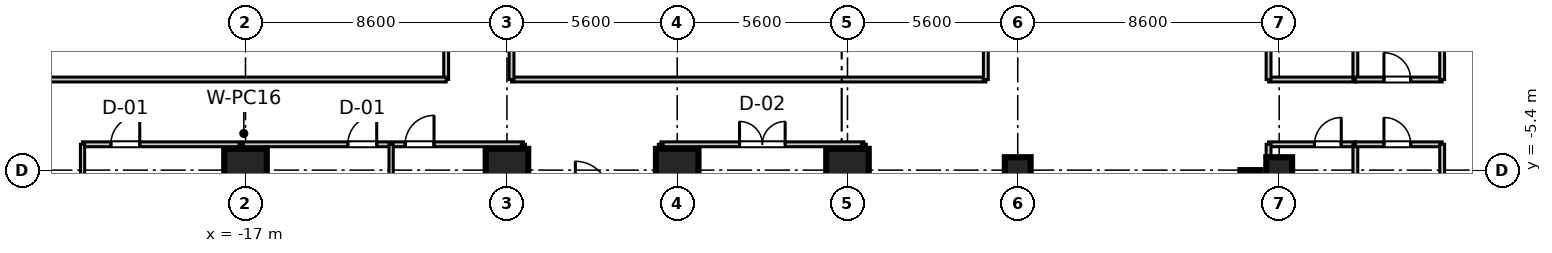
"""IFC4 building model, lengths in metres.
Left out: names, types, materials, properties, quantities, classifications, styles, units other than length and angle.
Written with IfcOpenShell. Run it as: python <this file> out.ifc"""

import sys

from ifc_helpers import new_model, si_unit, direction, frame, frame_2d, origin, origin_2d, place, context, subcontext, project, spatial, rectangle, extrude, source, transform, mapped, element, fill, save


model = new_model("IFC4")
c1 = context("Model", 3, precision=1e-05, world=origin(), true_north=direction((0.0, 1.0)))
c2 = subcontext(c1, "Body", "Model", "MODEL_VIEW")
j1 = project(units=[si_unit("LENGTHUNIT", "METRE"), si_unit("PLANEANGLEUNIT", "RADIAN")], contexts=[c1])
p1 = place(None, origin())
s1 = spatial("IfcSite", under=j1, at=p1, CompositionType="ELEMENT")
p2 = place(p1, origin())
s2 = spatial("IfcBuilding", under=s1, at=p2, CompositionType="ELEMENT")
p3 = place(p2, frame((0.0, 0.0, 76.2)))
s3 = spatial("IfcBuildingStorey", under=s2, at=p3, CompositionType="ELEMENT", Elevation=76.2)
m1 = source(origin(), c2, "Body", "SweptSolid", [
    extrude(rectangle(XDim=1.4, YDim=1.4, at=origin_2d()), origin(), (0.0, 0.0, 1.0), 3.605),
])
for number, where, z_axis, x_axis in (
    (1, (-17.0, -5.4, 0.0), (0.0, 0.0, 1.0), (1.0, 0.0, 0.0)),
    (2, (-8.4, -5.4, 0.0), (0.0, 0.0, 1.0), (1.0, 0.0, 0.0)),
    (3, (-2.8, -5.4, 0.0), (0.0, 0.0, 1.0), (1.0, 0.0, 0.0)),
    (4, (2.8, -5.4, 0.0), (0.0, 0.0, 1.0), (1.0, 0.0, 0.0)),
):
    element("IfcColumn", number, at=place(p3, frame(where, z_axis=z_axis, x_axis=x_axis)), inside=s3, PredefinedType="COLUMN", context=c2, shape_type="MappedRepresentation", body=[
        mapped(m1, transform((0.0, 0.0, 0.0), scale=1.0)),
    ])
m2 = source(origin(), c2, "Body", "SweptSolid", [
    extrude(rectangle(XDim=0.85, YDim=0.85, at=origin_2d()), origin(), (0.0, 0.0, 1.0), 3.605),
])
for number, where, z_axis, x_axis in (
    (5, (8.4, -5.4, 0.0), (0.0, 0.0, 1.0), (1.0, 0.0, 0.0)),
    (6, (17.0, -5.4, 0.0), (0.0, 0.0, 1.0), (1.0, 0.0, 0.0)),
):
    element("IfcColumn", number, at=place(p3, frame(where, z_axis=z_axis, x_axis=x_axis)), inside=s3, PredefinedType="PILASTER", context=c2, shape_type="MappedRepresentation", body=[
        mapped(m2, transform((0.0, 0.0, 0.0), scale=1.0)),
    ])
m3 = source(origin(), c2, "Body", "SweptSolid", [
    extrude(rectangle(XDim=11.6, YDim=0.65, at=frame_2d((5.8, 0.0))), origin(), (0.0, 0.0, 1.0), 3.37),
])
p4 = place(p3, frame((16.05, -17.0, 0.0), z_axis=(0.0, 0.0, 1.0), x_axis=(0.0, 1.0, 0.0)))
e7 = element("IfcWall", 7, at=p4, inside=s3, PredefinedType="SHEAR", context=c2, shape_type="MappedRepresentation", body=[
    mapped(m3, transform((0.0, 0.0, 0.0), scale=1.0)),
])
m4 = source(origin(), c2, "Body", "SweptSolid", [
    extrude(rectangle(XDim=2.855, YDim=0.16, at=frame_2d((1.427, 0.0))), origin(), (0.0, 0.0, 1.0), 2.71),
])
p5 = place(p3, frame((16.65, -4.55, 0.0), z_axis=(0.0, 0.0, 1.0), x_axis=(1.0, 0.0, 0.0)))
e8 = element("IfcWall", 8, at=p5, inside=s3, PredefinedType="PARTITIONING", context=c2, shape_type="MappedRepresentation", body=[
    mapped(m4, transform((0.0, 0.0, 0.0), scale=1.0)),
])
p6 = place(p5, frame((1.511, 0.0, 0.0)))
e9 = element("IfcOpeningElement", 9, at=p6, cuts=e8, PredefinedType="OPENING", context=c2, shape_type="SweptSolid", body=[
    extrude(rectangle(XDim=0.88, YDim=2.1, at=frame_2d((0.44, 1.05))), frame((0.0, 0.09, 0.0), z_axis=(0.0, -1.0, 0.0), x_axis=(1.0, 0.0, 0.0)), (0.0, 0.0, 1.0), 0.18),
])
m5 = source(origin(), c2, "Body", "SweptSolid", [
    extrude(rectangle(XDim=20.55, YDim=0.16, at=frame_2d((10.275, 0.0))), origin(), (0.0, 0.0, 1.0), 2.71),
])
for number, where, z_axis, x_axis in (
    (10, (16.65, -25.1, 0.0), (0.0, 0.0, 1.0), (0.0, 1.0, 0.0)),
    (11, (19.505, -25.1, 0.0), (0.0, 0.0, 1.0), (0.0, 1.0, 0.0)),
):
    element("IfcWall", number, at=place(p3, frame(where, z_axis=z_axis, x_axis=x_axis)), inside=s3, PredefinedType="PARTITIONING", context=c2, shape_type="MappedRepresentation", body=[
        mapped(m5, transform((0.0, 0.0, 0.0), scale=1.0)),
    ])
m6 = source(origin(), c2, "Body", "SweptSolid", [
    extrude(rectangle(XDim=2.855, YDim=0.16, at=frame_2d((1.428, 0.0))), origin(), (0.0, 0.0, 1.0), 2.71),
])
p7 = place(p3, frame((19.505, -4.55, 0.0), z_axis=(0.0, 0.0, 1.0), x_axis=(1.0, 0.0, 0.0)))
e12 = element("IfcWall", 12, at=p7, inside=s3, PredefinedType="PARTITIONING", context=c2, shape_type="MappedRepresentation", body=[
    mapped(m6, transform((0.0, 0.0, 0.0), scale=1.0)),
])
p8 = place(p7, frame((0.94, 0.0, 0.0)))
e13 = element("IfcOpeningElement", 13, at=p8, cuts=e12, PredefinedType="OPENING", context=c2, shape_type="SweptSolid", body=[
    extrude(rectangle(XDim=0.88, YDim=2.1, at=frame_2d((0.44, 1.05))), frame((0.0, 0.09, 0.0), z_axis=(0.0, -1.0, 0.0), x_axis=(1.0, 0.0, 0.0)), (0.0, 0.0, 1.0), 0.18),
])
m7 = source(origin(), c2, "Body", "SweptSolid", [
    extrude(rectangle(XDim=19.13, YDim=0.16, at=frame_2d((9.565, 0.0))), origin(), (0.0, 0.0, 1.0), 2.71),
])
p9 = place(p3, frame((22.36, -23.68, 0.0), z_axis=(0.0, 0.0, 1.0), x_axis=(0.0, 1.0, 0.0)))
e14 = element("IfcWall", 14, at=p9, inside=s3, PredefinedType="PARTITIONING", context=c2, shape_type="MappedRepresentation", body=[
    mapped(m7, transform((0.0, 0.0, 0.0), scale=1.0)),
])
m8 = source(origin(), c2, "Body", "SweptSolid", [
    extrude(rectangle(XDim=14.5, YDim=0.16, at=frame_2d((7.25, 0.0))), origin(), (0.0, 0.0, 1.0), 2.71),
])
p10 = place(p3, frame((-22.36, -4.55, 0.0), z_axis=(0.0, 0.0, 1.0), x_axis=(1.0, 0.0, 0.0)))
e15 = element("IfcWall", 15, at=p10, inside=s3, PredefinedType="PARTITIONING", context=c2, shape_type="MappedRepresentation", body=[
    mapped(m8, transform((0.0, 0.0, 0.0), scale=1.0)),
])
p11 = place(p10, frame((0.932, 0.0, 0.0)))
e16 = element("IfcOpeningElement", 16, at=p11, cuts=e15, PredefinedType="OPENING", context=c2, shape_type="SweptSolid", body=[
    extrude(rectangle(XDim=0.95, YDim=2.1, at=frame_2d((0.475, 1.05))), frame((0.0, 0.09, 0.0), z_axis=(0.0, -1.0, 0.0), x_axis=(1.0, 0.0, 0.0)), (0.0, 0.0, 1.0), 0.18),
])
p12 = place(p10, frame((8.726, 0.0, 0.0)))
e17 = element("IfcOpeningElement", 17, at=p12, cuts=e15, PredefinedType="OPENING", context=c2, shape_type="SweptSolid", body=[
    extrude(rectangle(XDim=0.95, YDim=2.1, at=frame_2d((0.475, 1.05))), frame((0.0, 0.09, 0.0), z_axis=(0.0, -1.0, 0.0), x_axis=(1.0, 0.0, 0.0)), (0.0, 0.0, 1.0), 0.18),
])
p13 = place(p10, frame((10.611, 0.0, 0.0)))
e18 = element("IfcOpeningElement", 18, at=p13, cuts=e15, PredefinedType="OPENING", context=c2, shape_type="SweptSolid", body=[
    extrude(rectangle(XDim=0.95, YDim=2.1, at=frame_2d((0.475, 1.05))), frame((0.0, 0.09, 0.0), z_axis=(0.0, -1.0, 0.0), x_axis=(1.0, 0.0, 0.0)), (0.0, 0.0, 1.0), 0.18),
])
m9 = source(origin(), c2, "Body", "SweptSolid", [
    extrude(rectangle(XDim=19.13, YDim=0.14, at=frame_2d((9.565, 0.0))), origin(), (0.0, 0.0, 1.0), 2.71),
])
p14 = place(p3, frame((-22.36, -23.68, 0.0), z_axis=(0.0, 0.0, 1.0), x_axis=(0.0, 1.0, 0.0)))
e19 = element("IfcWall", 19, at=p14, inside=s3, PredefinedType="PARTITIONING", context=c2, shape_type="MappedRepresentation", body=[
    mapped(m9, transform((0.0, 0.0, 0.0), scale=1.0)),
])
m10 = source(origin(), c2, "Body", "SweptSolid", [
    extrude(rectangle(XDim=20.55, YDim=0.14, at=frame_2d((10.275, 0.0))), origin(), (0.0, 0.0, 1.0), 2.71),
])
for number, where, z_axis, x_axis in (
    (20, (-7.86, -25.1, 0.0), (0.0, 0.0, 1.0), (0.0, 1.0, 0.0)),
    (21, (-17.14, -25.1, 0.0), (0.0, 0.0, 1.0), (0.0, 1.0, 0.0)),
    (22, (-12.21, -25.1, 0.0), (0.0, 0.0, 1.0), (0.0, 1.0, 0.0)),
):
    element("IfcWall", number, at=place(p3, frame(where, z_axis=z_axis, x_axis=x_axis)), inside=s3, PredefinedType="PARTITIONING", context=c2, shape_type="MappedRepresentation", body=[
        mapped(m10, transform((0.0, 0.0, 0.0), scale=1.0)),
    ])
m11 = source(origin(), c2, "Body", "SweptSolid", [
    extrude(rectangle(XDim=6.68, YDim=0.16, at=frame_2d((3.34, 0.0))), origin(), (0.0, 0.0, 1.0), 2.71),
])
p15 = place(p3, frame((-3.34, -4.55, 0.0), z_axis=(0.0, 0.0, 1.0), x_axis=(1.0, 0.0, 0.0)))
e23 = element("IfcWall", 23, at=p15, inside=s3, PredefinedType="PARTITIONING", context=c2, shape_type="MappedRepresentation", body=[
    mapped(m11, transform((0.0, 0.0, 0.0), scale=1.0)),
])
p16 = place(p15, frame((2.59, 0.0, 0.0)))
e24 = element("IfcOpeningElement", 24, at=p16, cuts=e23, PredefinedType="OPENING", context=c2, shape_type="SweptSolid", body=[
    extrude(rectangle(XDim=1.5, YDim=2.15, at=frame_2d((0.75, 1.075))), frame((0.0, 0.09, 0.0), z_axis=(0.0, -1.0, 0.0), x_axis=(1.0, 0.0, 0.0)), (0.0, 0.0, 1.0), 0.18),
])
for number, where, z_axis, x_axis in (
    (25, (-3.34, -25.1, 0.0), (0.0, 0.0, 1.0), (0.0, 1.0, 0.0)),
    (26, (3.34, -25.1, 0.0), (0.0, 0.0, 1.0), (0.0, 1.0, 0.0)),
):
    element("IfcWall", number, at=place(p3, frame(where, z_axis=z_axis, x_axis=x_axis)), inside=s3, PredefinedType="PARTITIONING", context=c2, shape_type="MappedRepresentation", body=[
        mapped(m5, transform((0.0, 0.0, 0.0), scale=1.0)),
    ])
m12 = source(origin(), c2, "Body", "SweptSolid", [
    extrude(rectangle(XDim=4.84, YDim=0.16, at=frame_2d((2.42, 0.0))), origin(), (0.0, 0.0, 1.0), 2.71),
])
p17 = place(p3, frame((-10.4, -2.42, 0.0), z_axis=(0.0, 0.0, 1.0), x_axis=(0.0, 1.0, 0.0)))
e27 = element("IfcWall", 27, at=p17, inside=s3, PredefinedType="PARTITIONING", context=c2, shape_type="MappedRepresentation", body=[
    mapped(m12, transform((0.0, 0.0, 0.0), scale=1.0)),
])
m13 = source(origin(), c2, "Body", "SweptSolid", [
    extrude(rectangle(XDim=14.7, YDim=0.16, at=frame_2d((7.35, 0.0))), origin(), (0.0, 0.0, 1.0), 2.71),
])
p18 = place(p3, frame((-25.1, -2.42, 0.0), z_axis=(0.0, 0.0, 1.0), x_axis=(1.0, 0.0, 0.0)))
e28 = element("IfcWall", 28, at=p18, inside=s3, PredefinedType="PARTITIONING", context=c2, shape_type="MappedRepresentation", body=[
    mapped(m13, transform((0.0, 0.0, 0.0), scale=1.0)),
])
m14 = source(origin(), c2, "Body", "SweptSolid", [
    extrude(rectangle(XDim=15.6, YDim=0.16, at=frame_2d((7.8, 0.0))), origin(), (0.0, 0.0, 1.0), 2.71),
])
p19 = place(p3, frame((-8.25, -2.42, 0.0), z_axis=(0.0, 0.0, 1.0), x_axis=(1.0, 0.0, 0.0)))
e29 = element("IfcWall", 29, at=p19, inside=s3, PredefinedType="PARTITIONING", context=c2, shape_type="MappedRepresentation", body=[
    mapped(m14, transform((0.0, 0.0, 0.0), scale=1.0)),
])
for number, where, z_axis, x_axis in (
    (30, (-8.25, -2.42, 0.0), (0.0, 0.0, 1.0), (0.0, 1.0, 0.0)),
    (31, (7.35, -2.42, 0.0), (0.0, 0.0, 1.0), (0.0, 1.0, 0.0)),
):
    element("IfcWall", number, at=place(p3, frame(where, z_axis=z_axis, x_axis=x_axis)), inside=s3, PredefinedType="PARTITIONING", context=c2, shape_type="MappedRepresentation", body=[
        mapped(m12, transform((0.0, 0.0, 0.0), scale=1.0)),
    ])
p20 = place(p3, frame((16.65, -2.42, 0.0), z_axis=(0.0, 0.0, 1.0), x_axis=(1.0, 0.0, 0.0)))
e32 = element("IfcWall", 32, at=p20, inside=s3, PredefinedType="PARTITIONING", context=c2, shape_type="MappedRepresentation", body=[
    mapped(m4, transform((0.0, 0.0, 0.0), scale=1.0)),
])
for number, where, z_axis, x_axis in (
    (33, (16.65, -2.42, 0.0), (0.0, 0.0, 1.0), (0.0, 1.0, 0.0)),
    (34, (19.505, -2.42, 0.0), (0.0, 0.0, 1.0), (0.0, 1.0, 0.0)),
):
    element("IfcWall", number, at=place(p3, frame(where, z_axis=z_axis, x_axis=x_axis)), inside=s3, PredefinedType="PARTITIONING", context=c2, shape_type="MappedRepresentation", body=[
        mapped(m12, transform((0.0, 0.0, 0.0), scale=1.0)),
    ])
p21 = place(p3, frame((19.505, -2.42, 0.0), z_axis=(0.0, 0.0, 1.0), x_axis=(1.0, 0.0, 0.0)))
e35 = element("IfcWall", 35, at=p21, inside=s3, PredefinedType="PARTITIONING", context=c2, shape_type="MappedRepresentation", body=[
    mapped(m6, transform((0.0, 0.0, 0.0), scale=1.0)),
])
p22 = place(p21, frame((0.94, 0.0, 0.0)))
e36 = element("IfcOpeningElement", 36, at=p22, cuts=e35, PredefinedType="OPENING", context=c2, shape_type="SweptSolid", body=[
    extrude(rectangle(XDim=0.88, YDim=2.1, at=frame_2d((0.44, 1.05))), frame((0.0, 0.09, 0.0), z_axis=(0.0, -1.0, 0.0), x_axis=(1.0, 0.0, 0.0)), (0.0, 0.0, 1.0), 0.18),
])
p23 = place(p3, frame((22.36, -2.42, 0.0), z_axis=(0.0, 0.0, 1.0), x_axis=(0.0, 1.0, 0.0)))
e37 = element("IfcWall", 37, at=p23, inside=s3, PredefinedType="PARTITIONING", context=c2, shape_type="MappedRepresentation", body=[
    mapped(m12, transform((0.0, 0.0, 0.0), scale=1.0)),
])
m15 = source(origin(), c2, "Body", "SweptSolid", [
    extrude(rectangle(XDim=0.88, YDim=2.1, at=frame_2d((0.44, 1.05))), frame((0.0, 0.025, 0.0), z_axis=(0.0, -1.0, 0.0), x_axis=(1.0, 0.0, 0.0)), (0.0, 0.0, 1.0), 0.05),
])
p24 = place(p6, frame((0.88, 0.0, 0.0), z_axis=(0.0, 0.0, 1.0), x_axis=(-1.0, 0.0, 0.0)))
e38 = element("IfcDoor", 38, at=p24, inside=s3, OperationType="SINGLE_SWING_RIGHT", PredefinedType="DOOR", context=c2, shape_type="MappedRepresentation", body=[
    mapped(m15, transform((0.0, 0.0, 0.0), scale=1.0)),
])
fill(e9, e38)
p25 = place(p8, frame((0.88, 0.0, 0.0), z_axis=(0.0, 0.0, 1.0), x_axis=(-1.0, 0.0, 0.0)))
e39 = element("IfcDoor", 39, at=p25, inside=s3, OperationType="SINGLE_SWING_LEFT", PredefinedType="DOOR", context=c2, shape_type="MappedRepresentation", body=[
    mapped(m15, transform((0.0, 0.0, 0.0), scale=1.0)),
])
fill(e13, e39)
m16 = source(origin(), c2, "Body", "SweptSolid", [
    extrude(rectangle(XDim=0.95, YDim=2.1, at=frame_2d((0.475, 1.05))), frame((0.0, 0.025, 0.0), z_axis=(0.0, -1.0, 0.0), x_axis=(1.0, 0.0, 0.0)), (0.0, 0.0, 1.0), 0.05),
])
p26 = place(p11, frame((0.95, 0.0, 0.0), z_axis=(0.0, 0.0, 1.0), x_axis=(-1.0, 0.0, 0.0)))
e40 = element("IfcDoor", 40, at=p26, inside=s3, OperationType="SINGLE_SWING_RIGHT", PredefinedType="DOOR", context=c2, shape_type="MappedRepresentation", body=[
    mapped(m16, transform((0.0, 0.0, 0.0), scale=1.0)),
])
fill(e16, e40)
p27 = place(p12, frame((0.95, 0.0, 0.0), z_axis=(0.0, 0.0, 1.0), x_axis=(-1.0, 0.0, 0.0)))
e41 = element("IfcDoor", 41, at=p27, inside=s3, OperationType="SINGLE_SWING_RIGHT", PredefinedType="DOOR", context=c2, shape_type="MappedRepresentation", body=[
    mapped(m16, transform((0.0, 0.0, 0.0), scale=1.0)),
])
fill(e17, e41)
p28 = place(p13, frame((0.95, 0.0, 0.0), z_axis=(0.0, 0.0, 1.0), x_axis=(-1.0, 0.0, 0.0)))
e42 = element("IfcDoor", 42, at=p28, inside=s3, OperationType="SINGLE_SWING_RIGHT", PredefinedType="DOOR", context=c2, shape_type="MappedRepresentation", body=[
    mapped(m16, transform((0.0, 0.0, 0.0), scale=1.0)),
])
fill(e18, e42)
m17 = source(origin(), c2, "Body", "SweptSolid", [
    extrude(rectangle(XDim=1.5, YDim=2.15, at=frame_2d((0.75, 1.075))), frame((0.0, 0.025, 0.0), z_axis=(0.0, -1.0, 0.0), x_axis=(1.0, 0.0, 0.0)), (0.0, 0.0, 1.0), 0.05),
])
p29 = place(p16, frame((1.5, 0.0, 0.0), z_axis=(0.0, 0.0, 1.0), x_axis=(-1.0, 0.0, 0.0)))
e43 = element("IfcDoor", 43, at=p29, inside=s3, OperationType="DOUBLE_DOOR_SINGLE_SWING", PredefinedType="DOOR", context=c2, shape_type="MappedRepresentation", body=[
    mapped(m17, transform((0.0, 0.0, 0.0), scale=1.0)),
])
fill(e24, e43)
p30 = place(p22, origin())
e44 = element("IfcDoor", 44, at=p30, inside=s3, OperationType="SINGLE_SWING_LEFT", PredefinedType="DOOR", context=c2, shape_type="MappedRepresentation", body=[
    mapped(m15, transform((0.0, 0.0, 0.0), scale=1.0)),
])
fill(e36, e44)
save(model, sys.argv[1])
